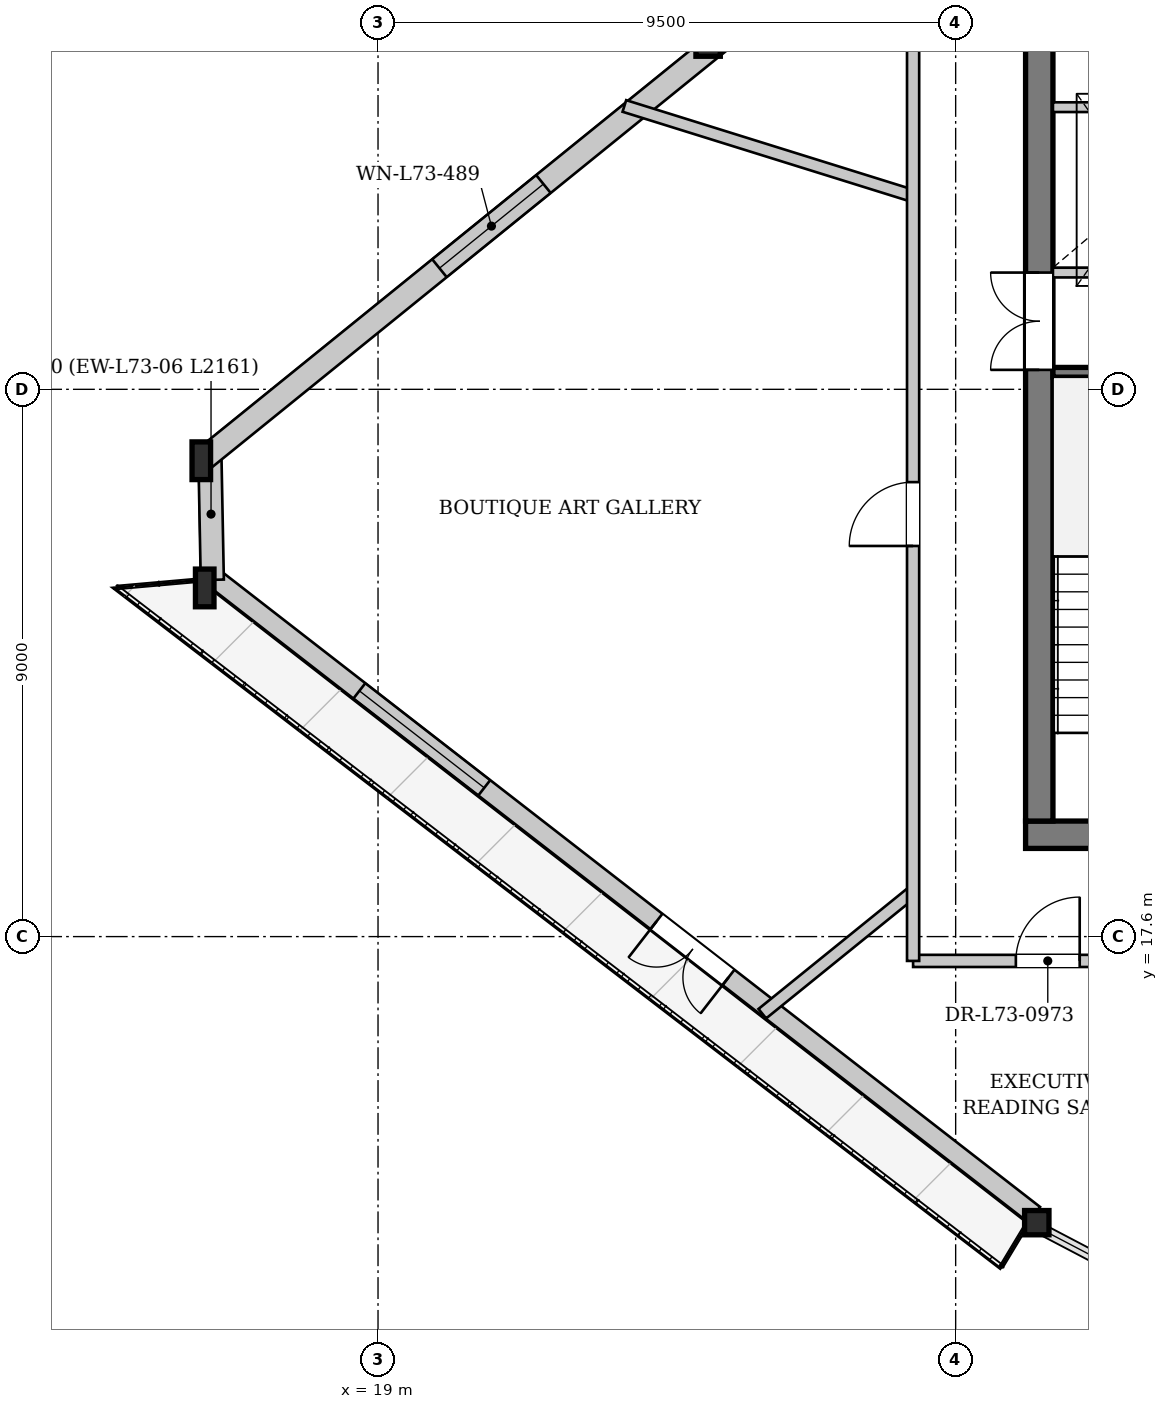
"""IFC4 building model, lengths in metres.
Left out: names, types, materials, properties, quantities, classifications, styles, units other than length and angle.
Written with IfcOpenShell. Run it as: python <this file> out.ifc"""

import sys

from ifc_helpers import new_model, si_unit, direction, frame, frame_2d, origin, origin_2d, place, context, subcontext, project, spatial, rectangle, i_section, extrude, source, transform, mapped, element, fill, save


model = new_model("IFC4")
c1 = context("Model", 3, precision=1e-05, world=origin(), true_north=direction((0.0, 1.0)))
c2 = subcontext(c1, "Body", "Model", "MODEL_VIEW")
j1 = project(units=[si_unit("LENGTHUNIT", "METRE"), si_unit("PLANEANGLEUNIT", "RADIAN")], contexts=[c1])
p1 = place(None, origin())
s1 = spatial("IfcSite", under=j1, at=p1, CompositionType="ELEMENT")
p2 = place(p1, origin())
s2 = spatial("IfcBuilding", under=s1, at=p2, CompositionType="ELEMENT")
p3 = place(p2, frame((0.0, 0.0, 274.1)))
s3 = spatial("IfcBuildingStorey", under=s2, at=p3, CompositionType="ELEMENT", Elevation=274.1)
m1 = source(origin(), c2, "Body", "SweptSolid", [
    extrude(i_section(OverallWidth=0.401, OverallDepth=0.399, WebThickness=0.022, FlangeThickness=0.034, at=origin_2d()), origin(), (0.0, 0.0, 1.0), 3.448),
])
p4 = place(p3, frame((24.441, 32.423, 0.0), z_axis=(-0.006940259878, -0.085053592994, 0.996352206357), x_axis=(0.996687362069, -0.081328360935, 0.0)))
e1 = element("IfcColumn", 1, at=p4, inside=s3, PredefinedType="COLUMN", context=c2, shape_type="MappedRepresentation", body=[
    mapped(m1, transform((0.0, 0.0, 0.0), x_axis=(1.0, 0.0, 0.0), y_axis=(0.0, 1.0, 0.0), z_axis=(0.0, 0.0, 1.0), scale=1.0)),
])
m2 = source(origin(), c2, "Body", "SweptSolid", [
    extrude(i_section(OverallWidth=0.305, OverallDepth=0.62, WebThickness=0.021, FlangeThickness=0.04, at=origin_2d()), origin(), (0.0, 0.0, 1.0), 3.459),
])
p5 = place(p3, frame((16.043, 25.624, 0.0), z_axis=(0.02943041208, -0.114898587211, 0.992941169205), x_axis=(0.96872623949, 0.248131966749, 0.0)))
e2 = element("IfcColumn", 2, at=p5, inside=s3, PredefinedType="COLUMN", context=c2, shape_type="MappedRepresentation", body=[
    mapped(m2, transform((0.0, 0.0, 0.0), x_axis=(1.0, 0.0, 0.0), y_axis=(0.0, 1.0, 0.0), z_axis=(0.0, 0.0, 1.0), scale=1.0)),
])
m3 = source(origin(), c2, "Body", "SweptSolid", [
    extrude(i_section(OverallWidth=0.305, OverallDepth=0.62, WebThickness=0.021, FlangeThickness=0.04, at=origin_2d()), origin(), (0.0, 0.0, 1.0), 3.447),
])
p6 = place(p3, frame((16.084, 23.464, 0.0), z_axis=(0.037891151836, -0.075428180757, 0.996431056401), x_axis=(0.893586568381, 0.448890905243, 0.0)))
e3 = element("IfcColumn", 3, at=p6, inside=s3, PredefinedType="COLUMN", context=c2, shape_type="MappedRepresentation", body=[
    mapped(m3, transform((0.0, 0.0, 0.0), x_axis=(1.0, 0.0, 0.0), y_axis=(0.0, 1.0, 0.0), z_axis=(0.0, 0.0, 1.0), scale=1.0)),
])
m4 = source(origin(), c2, "Body", "SweptSolid", [
    extrude(i_section(OverallWidth=0.401, OverallDepth=0.399, WebThickness=0.022, FlangeThickness=0.034, at=origin_2d()), origin(), (0.0, 0.0, 1.0), 3.447),
])
p7 = place(p3, frame((29.692, 12.902, 0.0), z_axis=(0.082663911936, -0.003541727161, 0.996571188542), x_axis=(0.042805630631, 0.999083418933, 0.0)))
e4 = element("IfcColumn", 4, at=p7, inside=s3, PredefinedType="COLUMN", context=c2, shape_type="MappedRepresentation", body=[
    mapped(m4, transform((0.0, 0.0, 0.0), x_axis=(1.0, 0.0, 0.0), y_axis=(0.0, 1.0, 0.0), z_axis=(0.0, 0.0, 1.0), scale=1.0)),
])
p8 = place(p3, frame((29.79, 13.028, 0.0), z_axis=(0.0, 0.0, 1.0), x_axis=(-0.78993873284, 0.613185778014, 0.0)))
e5 = element("IfcWall", 5, at=p8, inside=s3, PredefinedType="SOLIDWALL", context=c2, shape_type="SweptSolid", body=[
    extrude(rectangle(XDim=17.226, YDim=0.32, at=frame_2d((8.613, 0.0))), origin(), (0.0, 0.0, 1.0), 2.812),
])
p9 = place(p8, frame((6.362, 0.0, 0.0)))
e6 = element("IfcOpeningElement", 6, at=p9, cuts=e5, PredefinedType="OPENING", context=c2, shape_type="SweptSolid", body=[
    extrude(rectangle(XDim=1.5, YDim=2.3, at=frame_2d((0.75, 1.15))), frame((0.0, 0.17, 0.0), z_axis=(0.0, -1.0, 0.0), x_axis=(1.0, 0.0, 0.0)), (0.0, 0.0, 1.0), 0.34),
])
p10 = place(p8, frame((11.447, 0.0, 0.342)))
e7 = element("IfcOpeningElement", 7, at=p10, cuts=e5, PredefinedType="OPENING", context=c2, shape_type="SweptSolid", body=[
    extrude(rectangle(XDim=2.6, YDim=2.35, at=frame_2d((1.3, 1.175))), frame((0.0, 0.17, 0.0), z_axis=(0.0, -1.0, 0.0), x_axis=(1.0, 0.0, 0.0)), (0.0, 0.0, 1.0), 0.34),
])
p11 = place(p3, frame((16.274, 23.468, 0.0), z_axis=(0.0, 0.0, 1.0), x_axis=(-0.019207666141, 0.999815515763, 0.0)))
e8 = element("IfcWall", 8, at=p11, inside=s3, PredefinedType="SOLIDWALL", context=c2, shape_type="SweptSolid", body=[
    extrude(rectangle(XDim=2.161, YDim=0.38, at=frame_2d((1.081, 0.0))), origin(), (0.0, 0.0, 1.0), 2.812),
])
p12 = place(p3, frame((16.162, 25.477, 0.0), z_axis=(0.0, 0.0, 1.0), x_axis=(0.777216193482, 0.629233651825, 0.0)))
e9 = element("IfcWall", 9, at=p12, inside=s3, PredefinedType="SOLIDWALL", context=c2, shape_type="SweptSolid", body=[
    extrude(rectangle(XDim=21.611, YDim=0.38, at=frame_2d((10.805, 0.0))), origin(), (0.0, 0.0, 1.0), 2.812),
])
p13 = place(p12, frame((4.951, 0.0, 0.442)))
e10 = element("IfcOpeningElement", 10, at=p13, cuts=e9, PredefinedType="OPENING", context=c2, shape_type="SweptSolid", body=[
    extrude(rectangle(XDim=2.2, YDim=2.25, at=frame_2d((1.1, 1.125))), frame((0.0, 0.2, 0.0), z_axis=(0.0, -1.0, 0.0), x_axis=(1.0, 0.0, 0.0)), (0.0, 0.0, 1.0), 0.4),
])
p14 = place(p12, frame((17.46, 0.0, 0.442)))
e11 = element("IfcOpeningElement", 11, at=p14, cuts=e9, PredefinedType="OPENING", context=c2, shape_type="SweptSolid", body=[
    extrude(rectangle(XDim=2.2, YDim=2.25, at=frame_2d((1.1, 1.125))), frame((0.0, 0.2, 0.0), z_axis=(0.0, -1.0, 0.0), x_axis=(1.0, 0.0, 0.0)), (0.0, 0.0, 1.0), 0.4),
])
p15 = place(p3, frame((46.35, 19.275, 0.0), z_axis=(0.0, 0.0, 1.0), x_axis=(-1.0, 0.0, 0.0)))
e12 = element("IfcWall", 12, at=p15, inside=s3, PredefinedType="SHEAR", context=c2, shape_type="SweptSolid", body=[
    extrude(rectangle(XDim=16.7, YDim=0.45, at=frame_2d((8.35, 0.0))), origin(), (0.0, 0.0, 1.0), 3.32),
])
p16 = place(p15, frame((4.55, 0.0, 0.0)))
e13 = element("IfcOpeningElement", 13, at=p16, cuts=e12, PredefinedType="OPENING", context=c2, shape_type="SweptSolid", body=[
    extrude(rectangle(XDim=1.12, YDim=2.25, at=frame_2d((0.56, 1.125))), frame((0.0, 0.235, 0.0), z_axis=(0.0, -1.0, 0.0), x_axis=(1.0, 0.0, 0.0)), (0.0, 0.0, 1.0), 0.47),
])
p17 = place(p15, frame((11.05, 0.0, 0.0)))
e14 = element("IfcOpeningElement", 14, at=p17, cuts=e12, PredefinedType="OPENING", context=c2, shape_type="SweptSolid", body=[
    extrude(rectangle(XDim=1.12, YDim=2.25, at=frame_2d((0.56, 1.125))), frame((0.0, 0.235, 0.0), z_axis=(0.0, -1.0, 0.0), x_axis=(1.0, 0.0, 0.0)), (0.0, 0.0, 1.0), 0.47),
])
p18 = place(p3, frame((29.875, 19.5, 0.0), z_axis=(0.0, 0.0, 1.0), x_axis=(0.0, 1.0, 0.0)))
e15 = element("IfcWall", 15, at=p18, inside=s3, PredefinedType="SHEAR", context=c2, shape_type="SweptSolid", body=[
    extrude(rectangle(XDim=14.2, YDim=0.45, at=frame_2d((7.1, 0.0))), origin(), (0.0, 0.0, 1.0), 3.32),
])
p19 = place(p18, frame((7.42, 0.0, 0.0)))
e16 = element("IfcOpeningElement", 16, at=p19, cuts=e15, PredefinedType="OPENING", context=c2, shape_type="SweptSolid", body=[
    extrude(rectangle(XDim=1.6, YDim=2.2, at=frame_2d((0.8, 1.1))), frame((0.0, 0.235, 0.0), z_axis=(0.0, -1.0, 0.0), x_axis=(1.0, 0.0, 0.0)), (0.0, 0.0, 1.0), 0.47),
])
for number, where, z_axis, x_axis in (
    (17, (30.1, 26.88, 0.0), (0.0, 0.0, 1.0), (1.0, 0.0, 0.0)),
    (18, (30.1, 28.52, 0.0), (0.0, 0.0, 1.0), (1.0, 0.0, 0.0)),
):
    element("IfcWall", number, at=place(p3, frame(where, z_axis=z_axis, x_axis=x_axis)), inside=s3, PredefinedType="PARTITIONING", context=c2, shape_type="SweptSolid", body=[
        extrude(rectangle(XDim=3.02, YDim=0.16, at=frame_2d((1.51, 0.0))), origin(), (0.0, 0.0, 1.0), 3.32),
    ])
p20 = place(p3, frame((30.1, 31.24, 0.0), z_axis=(0.0, 0.0, 1.0), x_axis=(1.0, 0.0, 0.0)))
e19 = element("IfcWall", 19, at=p20, inside=s3, PredefinedType="PARTITIONING", context=c2, shape_type="SweptSolid", body=[
    extrude(rectangle(XDim=3.02, YDim=0.16, at=frame_2d((1.51, 0.0))), origin(), (0.0, 0.0, 1.0), 3.32),
])
p21 = place(p20, frame((0.91, 0.0, 0.0)))
e20 = element("IfcOpeningElement", 20, at=p21, cuts=e19, PredefinedType="OPENING", context=c2, shape_type="SweptSolid", body=[
    extrude(rectangle(XDim=1.2, YDim=2.2, at=frame_2d((0.6, 1.1))), frame((0.0, 0.09, 0.0), z_axis=(0.0, -1.0, 0.0), x_axis=(1.0, 0.0, 0.0)), (0.0, 0.0, 1.0), 0.18),
])
p22 = place(p3, frame((27.8, 29.78, 0.0), z_axis=(0.0, 0.0, 1.0), x_axis=(-0.954691098167, 0.297598567002, 0.0)))
e21 = element("IfcWall", 21, at=p22, inside=s3, PredefinedType="PARTITIONING", context=c2, shape_type="SweptSolid", body=[
    extrude(rectangle(XDim=4.974, YDim=0.2, at=frame_2d((2.487, 0.0))), origin(), (0.0, 0.0, 1.0), 3.32),
])
p23 = place(p3, frame((27.8, 18.341, 0.0), z_axis=(0.0, 0.0, 1.0), x_axis=(-0.777145079271, -0.629321480457, 0.0)))
e22 = element("IfcWall", 22, at=p23, inside=s3, PredefinedType="PARTITIONING", context=c2, shape_type="SweptSolid", body=[
    extrude(rectangle(XDim=3.191, YDim=0.2, at=frame_2d((1.595, 0.0))), origin(), (0.0, 0.0, 1.0), 3.32),
])
p24 = place(p3, frame((27.8, 17.2, 0.0), z_axis=(0.0, 0.0, 1.0), x_axis=(1.0, 0.0, 0.0)))
e23 = element("IfcWall", 23, at=p24, inside=s3, PredefinedType="PARTITIONING", context=c2, shape_type="SweptSolid", body=[
    extrude(rectangle(XDim=20.4, YDim=0.2, at=frame_2d((10.2, 0.0))), origin(), (0.0, 0.0, 1.0), 3.32),
])
p25 = place(p24, frame((14.641, 0.0, 0.0)))
e24 = element("IfcOpeningElement", 24, at=p25, cuts=e23, PredefinedType="OPENING", context=c2, shape_type="SweptSolid", body=[
    extrude(rectangle(XDim=1.05, YDim=2.2, at=frame_2d((0.525, 1.1))), frame((0.0, 0.11, 0.0), z_axis=(0.0, -1.0, 0.0), x_axis=(1.0, 0.0, 0.0)), (0.0, 0.0, 1.0), 0.22),
])
p26 = place(p24, frame((19.05, 0.0, 0.0)))
e25 = element("IfcOpeningElement", 25, at=p26, cuts=e23, PredefinedType="OPENING", context=c2, shape_type="SweptSolid", body=[
    extrude(rectangle(XDim=1.05, YDim=2.2, at=frame_2d((0.525, 1.1))), frame((0.0, 0.11, 0.0), z_axis=(0.0, -1.0, 0.0), x_axis=(1.0, 0.0, 0.0)), (0.0, 0.0, 1.0), 0.22),
])
p27 = place(p24, frame((1.69, 0.0, 0.0)))
e26 = element("IfcOpeningElement", 26, at=p27, cuts=e23, PredefinedType="OPENING", context=c2, shape_type="SweptSolid", body=[
    extrude(rectangle(XDim=1.05, YDim=2.2, at=frame_2d((0.525, 1.1))), frame((0.0, 0.11, 0.0), z_axis=(0.0, -1.0, 0.0), x_axis=(1.0, 0.0, 0.0)), (0.0, 0.0, 1.0), 0.22),
])
p28 = place(p3, frame((27.8, 17.2, 0.0), z_axis=(0.0, 0.0, 1.0), x_axis=(0.0, 1.0, 0.0)))
e27 = element("IfcWall", 27, at=p28, inside=s3, PredefinedType="PARTITIONING", context=c2, shape_type="SweptSolid", body=[
    extrude(rectangle(XDim=17.904, YDim=0.2, at=frame_2d((8.952, 0.0))), origin(), (0.0, 0.0, 1.0), 3.32),
])
p29 = place(p28, frame((6.824, 0.0, 0.0)))
e28 = element("IfcOpeningElement", 28, at=p29, cuts=e27, PredefinedType="OPENING", context=c2, shape_type="SweptSolid", body=[
    extrude(rectangle(XDim=1.05, YDim=2.2, at=frame_2d((0.525, 1.1))), frame((0.0, 0.11, 0.0), z_axis=(0.0, -1.0, 0.0), x_axis=(1.0, 0.0, 0.0)), (0.0, 0.0, 1.0), 0.22),
])
m5 = source(origin(), c2, "Body", "SweptSolid", [
    extrude(rectangle(XDim=1.5, YDim=2.3, at=frame_2d((0.75, 1.15))), frame((0.0, 0.025, 0.0), z_axis=(0.0, -1.0, 0.0), x_axis=(1.0, 0.0, 0.0)), (0.0, 0.0, 1.0), 0.05),
])
p30 = place(p9, origin())
e29 = element("IfcDoor", 29, at=p30, inside=s3, OperationType="DOUBLE_DOOR_SINGLE_SWING", PredefinedType="DOOR", context=c2, shape_type="MappedRepresentation", body=[
    mapped(m5, transform((0.0, 0.0, 0.0), x_axis=(1.0, 0.0, 0.0), y_axis=(0.0, 1.0, 0.0), z_axis=(0.0, 0.0, 1.0), scale=1.0)),
])
fill(e6, e29)
m6 = source(origin(), c2, "Body", "SweptSolid", [
    extrude(rectangle(XDim=2.6, YDim=2.35, at=frame_2d((1.3, 1.175))), frame((0.0, 0.03, 0.0), z_axis=(0.0, -1.0, 0.0), x_axis=(1.0, 0.0, 0.0)), (0.0, 0.0, 1.0), 0.06),
])
p31 = place(p10, origin())
e30 = element("IfcWindow", 30, at=p31, inside=s3, PartitioningType="SINGLE_PANEL", PredefinedType="WINDOW", context=c2, shape_type="MappedRepresentation", body=[
    mapped(m6, transform((0.0, 0.0, 0.0), x_axis=(1.0, 0.0, 0.0), y_axis=(0.0, 1.0, 0.0), z_axis=(0.0, 0.0, 1.0), scale=1.0)),
])
fill(e7, e30)
m7 = source(origin(), c2, "Body", "SweptSolid", [
    extrude(rectangle(XDim=2.2, YDim=2.25, at=frame_2d((1.1, 1.125))), frame((0.0, 0.03, 0.0), z_axis=(0.0, -1.0, 0.0), x_axis=(1.0, 0.0, 0.0)), (0.0, 0.0, 1.0), 0.06),
])
p32 = place(p13, origin())
e31 = element("IfcWindow", 31, at=p32, inside=s3, PartitioningType="SINGLE_PANEL", PredefinedType="WINDOW", context=c2, shape_type="MappedRepresentation", body=[
    mapped(m7, transform((0.0, 0.0, 0.0), x_axis=(1.0, 0.0, 0.0), y_axis=(0.0, 1.0, 0.0), z_axis=(0.0, 0.0, 1.0), scale=1.0)),
])
fill(e10, e31)
m8 = source(origin(), c2, "Body", "SweptSolid", [
    extrude(rectangle(XDim=1.6, YDim=2.2, at=frame_2d((0.8, 1.1))), frame((0.0, 0.025, 0.0), z_axis=(0.0, -1.0, 0.0), x_axis=(1.0, 0.0, 0.0)), (0.0, 0.0, 1.0), 0.05),
])
p33 = place(p19, origin())
e32 = element("IfcDoor", 32, at=p33, inside=s3, OperationType="DOUBLE_DOOR_SINGLE_SWING", PredefinedType="DOOR", context=c2, shape_type="MappedRepresentation", body=[
    mapped(m8, transform((0.0, 0.0, 0.0), x_axis=(1.0, 0.0, 0.0), y_axis=(0.0, 1.0, 0.0), z_axis=(0.0, 0.0, 1.0), scale=1.0)),
])
fill(e16, e32)
m9 = source(origin(), c2, "Body", "SweptSolid", [
    extrude(rectangle(XDim=1.05, YDim=2.2, at=frame_2d((0.525, 1.1))), frame((0.0, 0.025, 0.0), z_axis=(0.0, -1.0, 0.0), x_axis=(1.0, 0.0, 0.0)), (0.0, 0.0, 1.0), 0.05),
])
p34 = place(p27, origin())
e33 = element("IfcDoor", 33, at=p34, inside=s3, OperationType="SINGLE_SWING_RIGHT", PredefinedType="DOOR", context=c2, shape_type="MappedRepresentation", body=[
    mapped(m9, transform((0.0, 0.0, 0.0), x_axis=(1.0, 0.0, 0.0), y_axis=(0.0, 1.0, 0.0), z_axis=(0.0, 0.0, 1.0), scale=1.0)),
])
fill(e26, e33)
p35 = place(p29, origin())
e34 = element("IfcDoor", 34, at=p35, inside=s3, OperationType="SINGLE_SWING_LEFT", PredefinedType="DOOR", context=c2, shape_type="MappedRepresentation", body=[
    mapped(m9, transform((0.0, 0.0, 0.0), x_axis=(1.0, 0.0, 0.0), y_axis=(0.0, 1.0, 0.0), z_axis=(0.0, 0.0, 1.0), scale=1.0)),
])
fill(e28, e34)
save(model, sys.argv[1])
